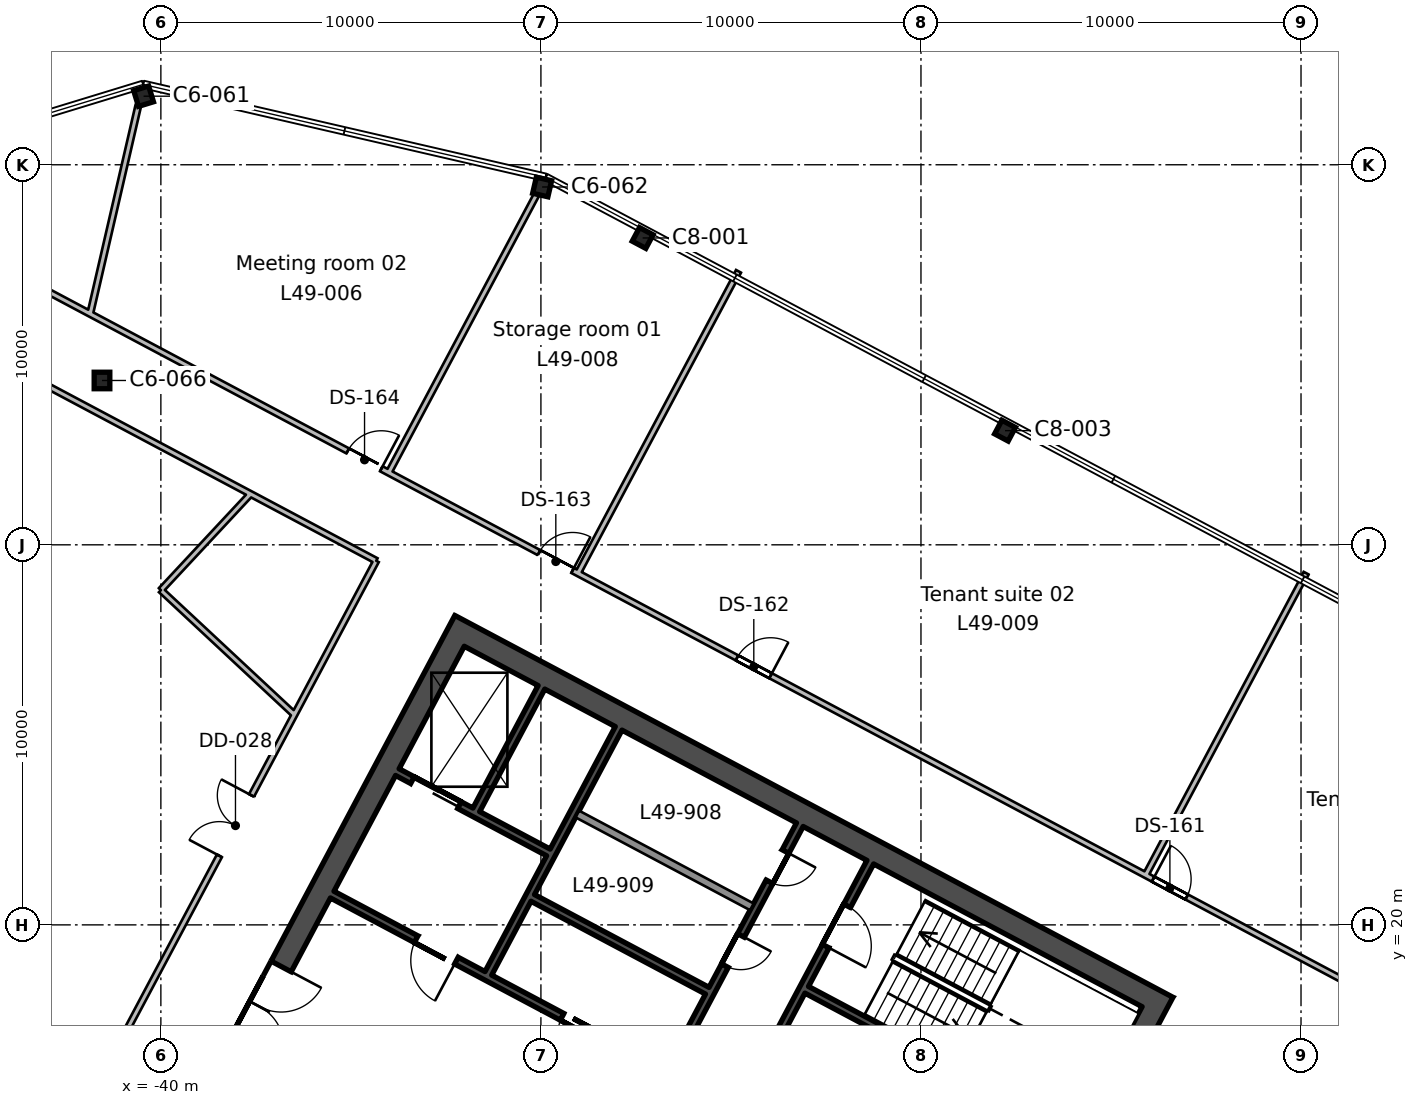
"""IFC4 building model, lengths in metres.
Left out: names, types, materials, properties, quantities, classifications, styles, units other than length and angle.
Written with IfcOpenShell. Run it as: python <this file> out.ifc"""

import sys

from ifc_helpers import new_model, si_unit, direction, frame, frame_2d, origin, origin_2d, place, context, subcontext, project, spatial, rectangle, i_section, extrude, element, fill, save


model = new_model("IFC4")
c1 = context("Model", 3, precision=1e-05, world=origin(), true_north=direction((0.0, 1.0)))
c2 = subcontext(c1, "Body", "Model", "MODEL_VIEW")
j1 = project(units=[si_unit("LENGTHUNIT", "METRE"), si_unit("PLANEANGLEUNIT", "RADIAN")], contexts=[c1])
p1 = place(None, origin())
s1 = spatial("IfcSite", under=j1, at=p1, CompositionType="ELEMENT")
p2 = place(p1, origin())
s2 = spatial("IfcBuilding", under=s1, at=p2, CompositionType="ELEMENT")
p3 = place(p2, frame((0.0, 0.0, 224.7)))
s3 = spatial("IfcBuildingStorey", under=s2, at=p3, CompositionType="ELEMENT", Elevation=224.7)
p4 = place(p3, frame((-17.788, 33.004, 0.0), z_axis=(0.0, 0.0, 1.0), x_axis=(-0.882947592859, 0.469471562786, 0.0)))
e1 = element("IfcColumn", 1, at=p4, inside=s3, PredefinedType="COLUMN", context=c2, shape_type="SweptSolid", body=[
    extrude(i_section(OverallWidth=0.404, OverallDepth=0.406, WebThickness=0.027, FlangeThickness=0.044, FilletRadius=0.015, at=origin_2d()), origin(), (0.0, 0.0, 1.0), 3.9),
])
p5 = place(p3, frame((-41.549, 34.324, 0.0), z_axis=(0.0, 0.0, 1.0), x_axis=(1.0, 0.0, 0.0)))
e2 = element("IfcColumn", 2, at=p5, inside=s3, PredefinedType="COLUMN", context=c2, shape_type="SweptSolid", body=[
    extrude(i_section(OverallWidth=0.412, OverallDepth=0.434, WebThickness=0.036, FlangeThickness=0.057, FilletRadius=0.015, at=origin_2d()), origin(), (0.0, 0.0, 1.0), 3.9),
])
p6 = place(p3, frame((-27.323, 38.074, 0.0), z_axis=(0.0, 0.0, 1.0), x_axis=(-0.882947592859, 0.469471562786, 0.0)))
e3 = element("IfcColumn", 3, at=p6, inside=s3, PredefinedType="COLUMN", context=c2, shape_type="SweptSolid", body=[
    extrude(i_section(OverallWidth=0.404, OverallDepth=0.406, WebThickness=0.027, FlangeThickness=0.044, FilletRadius=0.015, at=origin_2d()), origin(), (0.0, 0.0, 1.0), 3.9),
])
for number, where, z_axis, x_axis in (
    (4, (-29.968, 39.415, 0.0), (0.0, 0.0, 1.0), (-0.974, 0.225, 0.0)),
    (5, (-40.455, 41.804, 0.0), (0.0, 0.0, 1.0), (-0.956, -0.292, 0.0)),
):
    element("IfcColumn", number, at=place(p3, frame(where, z_axis=z_axis, x_axis=x_axis)), inside=s3, PredefinedType="COLUMN", context=c2, shape_type="SweptSolid", body=[
        extrude(i_section(OverallWidth=0.412, OverallDepth=0.434, WebThickness=0.036, FlangeThickness=0.057, FilletRadius=0.015, at=origin_2d()), origin(), (0.0, 0.0, 1.0), 3.9),
    ])
p7 = place(p3, frame((-13.635, 18.236, 0.0), z_axis=(0.0, 0.0, 1.0), x_axis=(-0.469478769487, -0.88294376095, 0.0)))
e6 = element("IfcWall", 6, at=p7, inside=s3, PredefinedType="SHEAR", context=c2, shape_type="SweptSolid", body=[
    extrude(rectangle(XDim=19.4, YDim=0.6, at=frame_2d((9.7, 0.0))), origin(), (0.0, 0.0, 1.0), 3.9),
])
p8 = place(p7, frame((6.7, 0.0, 0.0)))
e7 = element("IfcOpeningElement", 7, at=p8, cuts=e6, PredefinedType="OPENING", context=c2, shape_type="SweptSolid", body=[
    extrude(rectangle(XDim=2.4, YDim=2.4, at=frame_2d((1.2, 1.2))), frame((0.0, 0.31, 0.0), z_axis=(0.0, -1.0, 0.0), x_axis=(1.0, 0.0, 0.0)), (0.0, 0.0, 1.0), 0.62),
])
p9 = place(p3, frame((-32.0, 28.001, 0.0), z_axis=(0.0, 0.0, 1.0), x_axis=(-0.469468958625, -0.882948977511, 0.0)))
e8 = element("IfcWall", 8, at=p9, inside=s3, PredefinedType="SHEAR", context=c2, shape_type="SweptSolid", body=[
    extrude(rectangle(XDim=19.4, YDim=0.6, at=frame_2d((9.7, 0.0))), origin(), (0.0, 0.0, 1.0), 3.9),
])
p10 = place(p9, frame((10.3, 0.0, 0.0)))
e9 = element("IfcOpeningElement", 9, at=p10, cuts=e8, PredefinedType="OPENING", context=c2, shape_type="SweptSolid", body=[
    extrude(rectangle(XDim=2.4, YDim=2.4, at=frame_2d((1.2, 1.2))), frame((0.0, 0.31, 0.0), z_axis=(0.0, -1.0, 0.0), x_axis=(1.0, 0.0, 0.0)), (0.0, 0.0, 1.0), 0.62),
])
p11 = place(p3, frame((-14.041, 18.112, 0.0), z_axis=(0.0, 0.0, 1.0), x_axis=(-0.882947755831, 0.46947125628, 0.0)))
e10 = element("IfcWall", 10, at=p11, inside=s3, PredefinedType="SHEAR", context=c2, shape_type="SweptSolid", body=[
    extrude(rectangle(XDim=20.2, YDim=0.6, at=frame_2d((10.1, 0.0))), origin(), (0.0, 0.0, 1.0), 3.9),
])
p12 = place(p3, frame((-21.333, 21.649, 0.0), z_axis=(0.0, 0.0, 1.0), x_axis=(-0.469494272526, -0.882935517501, 0.0)))
e11 = element("IfcWall", 11, at=p12, inside=s3, PredefinedType="SHEAR", context=c2, shape_type="SweptSolid", body=[
    extrude(rectangle(XDim=7.3, YDim=0.2, at=frame_2d((3.65, 0.0))), origin(), (0.0, 0.0, 1.0), 3.9),
])
p13 = place(p12, frame((1.3, 0.0, 0.0)))
e12 = element("IfcOpeningElement", 12, at=p13, cuts=e11, PredefinedType="OPENING", context=c2, shape_type="SweptSolid", body=[
    extrude(rectangle(XDim=1.2, YDim=2.1, at=frame_2d((0.6, 1.05))), frame((0.0, 0.11, 0.0), z_axis=(0.0, -1.0, 0.0), x_axis=(1.0, 0.0, 0.0)), (0.0, 0.0, 1.0), 0.22),
])
p14 = place(p3, frame((-23.188, 22.635, 0.0), z_axis=(0.0, 0.0, 1.0), x_axis=(-0.469454336211, -0.882956752176, 0.0)))
e13 = element("IfcWall", 13, at=p14, inside=s3, PredefinedType="SHEAR", context=c2, shape_type="SweptSolid", body=[
    extrude(rectangle(XDim=7.3, YDim=0.2, at=frame_2d((3.65, 0.0))), origin(), (0.0, 0.0, 1.0), 3.9),
])
p15 = place(p14, frame((0.8, 0.0, 0.0)))
e14 = element("IfcOpeningElement", 14, at=p15, cuts=e13, PredefinedType="OPENING", context=c2, shape_type="SweptSolid", body=[
    extrude(rectangle(XDim=0.9, YDim=2.1, at=frame_2d((0.45, 1.05))), frame((0.0, 0.11, 0.0), z_axis=(0.0, -1.0, 0.0), x_axis=(1.0, 0.0, 0.0)), (0.0, 0.0, 1.0), 0.22),
])
p16 = place(p14, frame((3.3, 0.0, 0.0)))
e15 = element("IfcOpeningElement", 15, at=p16, cuts=e13, PredefinedType="OPENING", context=c2, shape_type="SweptSolid", body=[
    extrude(rectangle(XDim=0.9, YDim=2.1, at=frame_2d((0.45, 1.05))), frame((0.0, 0.11, 0.0), z_axis=(0.0, -1.0, 0.0), x_axis=(1.0, 0.0, 0.0)), (0.0, 0.0, 1.0), 0.22),
])
p17 = place(p3, frame((-27.955, 25.171, 0.0), z_axis=(0.0, 0.0, 1.0), x_axis=(-0.469480409012, -0.88294288918, 0.0)))
e16 = element("IfcWall", 16, at=p17, inside=s3, PredefinedType="SHEAR", context=c2, shape_type="SweptSolid", body=[
    extrude(rectangle(XDim=7.3, YDim=0.2, at=frame_2d((3.65, 0.0))), origin(), (0.0, 0.0, 1.0), 3.9),
])
p18 = place(p3, frame((-29.986, 26.25, 0.0), z_axis=(0.0, 0.0, 1.0), x_axis=(-0.469494272526, -0.882935517501, 0.0)))
e17 = element("IfcWall", 17, at=p18, inside=s3, PredefinedType="SHEAR", context=c2, shape_type="SweptSolid", body=[
    extrude(rectangle(XDim=3.65, YDim=0.2, at=frame_2d((1.825, 0.0))), origin(), (0.0, 0.0, 1.0), 3.9),
])
p19 = place(p3, frame((-24.449, 20.475, 0.0), z_axis=(0.0, 0.0, 1.0), x_axis=(-0.882934506056, 0.469496174655, 0.0)))
e18 = element("IfcWall", 18, at=p19, inside=s3, PredefinedType="SOLIDWALL", context=c2, shape_type="SweptSolid", body=[
    extrude(rectangle(XDim=5.2, YDim=0.2, at=frame_2d((2.6, 0.0))), origin(), (0.0, 0.0, 1.0), 3.9),
])
p20 = place(p3, frame((-15.942, 14.536, 0.0), z_axis=(0.0, 0.0, 1.0), x_axis=(-0.882946947542, 0.469472776449, 0.0)))
e19 = element("IfcWall", 19, at=p20, inside=s3, PredefinedType="SHEAR", context=c2, shape_type="SweptSolid", body=[
    extrude(rectangle(XDim=8.0, YDim=0.2, at=frame_2d((4.0, 0.0))), origin(), (0.0, 0.0, 1.0), 3.9),
])
p21 = place(p3, frame((-29.804, 21.906, 0.0), z_axis=(0.0, 0.0, 1.0), x_axis=(-0.882960433586, 0.469447412093, 0.0)))
e20 = element("IfcWall", 20, at=p21, inside=s3, PredefinedType="SHEAR", context=c2, shape_type="SweptSolid", body=[
    extrude(rectangle(XDim=4.5, YDim=0.2, at=frame_2d((2.25, 0.0))), origin(), (0.0, 0.0, 1.0), 3.9),
])
p22 = place(p21, frame((2.65, 0.0, 0.0)))
e21 = element("IfcOpeningElement", 21, at=p22, cuts=e20, PredefinedType="OPENING", context=c2, shape_type="SweptSolid", body=[
    extrude(rectangle(XDim=1.4, YDim=2.4, at=frame_2d((0.7, 1.2))), frame((0.0, 0.11, 0.0), z_axis=(0.0, -1.0, 0.0), x_axis=(1.0, 0.0, 0.0)), (0.0, 0.0, 1.0), 0.22),
])
p23 = place(p3, frame((-25.623, 18.268, 0.0), z_axis=(0.0, 0.0, 1.0), x_axis=(-0.882953967957, 0.469459572775, 0.0)))
e22 = element("IfcWall", 22, at=p23, inside=s3, PredefinedType="SHEAR", context=c2, shape_type="SweptSolid", body=[
    extrude(rectangle(XDim=5.2, YDim=0.2, at=frame_2d((2.6, 0.0))), origin(), (0.0, 0.0, 1.0), 3.9),
])
p24 = place(p3, frame((-26.662, 16.102, 0.0), z_axis=(0.0, 0.0, 1.0), x_axis=(-0.882940221191, 0.469485426614, 0.0)))
e23 = element("IfcWall", 23, at=p24, inside=s3, PredefinedType="SHEAR", context=c2, shape_type="SweptSolid", body=[
    extrude(rectangle(XDim=10.0, YDim=0.2, at=frame_2d((5.0, 0.0))), origin(), (0.0, 0.0, 1.0), 3.9),
])
p25 = place(p24, frame((6.3, 0.0, 0.0)))
e24 = element("IfcOpeningElement", 24, at=p25, cuts=e23, PredefinedType="OPENING", context=c2, shape_type="SweptSolid", body=[
    extrude(rectangle(XDim=1.2, YDim=2.1, at=frame_2d((0.6, 1.05))), frame((0.0, 0.11, 0.0), z_axis=(0.0, -1.0, 0.0), x_axis=(1.0, 0.0, 0.0)), (0.0, 0.0, 1.0), 0.22),
])
p26 = place(p24, frame((2.25, 0.0, 0.0)))
e25 = element("IfcOpeningElement", 25, at=p26, cuts=e23, PredefinedType="OPENING", context=c2, shape_type="SweptSolid", body=[
    extrude(rectangle(XDim=0.9, YDim=2.1, at=frame_2d((0.45, 1.05))), frame((0.0, 0.11, 0.0), z_axis=(0.0, -1.0, 0.0), x_axis=(1.0, 0.0, 0.0)), (0.0, 0.0, 1.0), 0.22),
])
p27 = place(p3, frame((-50.128, 17.948, 0.0), z_axis=(0.0, 0.0, 1.0), x_axis=(0.974372577987, -0.224940168193, 0.0)))
e26 = element("IfcWall", 26, at=p27, inside=s3, PredefinedType="PARTITIONING", context=c2, shape_type="SweptSolid", body=[
    extrude(rectangle(XDim=7.958, YDim=0.15, at=frame_2d((3.979, 0.0))), origin(), (0.0, 0.0, 1.0), 3.54),
])
p28 = place(p3, frame((-37.64, 31.339, 0.0), z_axis=(0.0, 0.0, 1.0), x_axis=(-0.681983873773, -0.731367210035, 0.0)))
e27 = element("IfcWall", 27, at=p28, inside=s3, PredefinedType="PARTITIONING", context=c2, shape_type="SweptSolid", body=[
    extrude(rectangle(XDim=3.461, YDim=0.15, at=frame_2d((1.73, 0.0))), origin(), (0.0, 0.0, 1.0), 3.54),
])
p29 = place(p3, frame((-40.0, 28.808, 0.0), z_axis=(0.0, 0.0, 1.0), x_axis=(0.731313661346, -0.682041295471, 0.0)))
e28 = element("IfcWall", 28, at=p29, inside=s3, PredefinedType="PARTITIONING", context=c2, shape_type="SweptSolid", body=[
    extrude(rectangle(XDim=4.806, YDim=0.15, at=frame_2d((2.403, 0.0))), origin(), (0.0, 0.0, 1.0), 3.54),
])
p30 = place(p3, frame((-41.769, 15.593, 0.0), z_axis=(0.0, 0.0, 1.0), x_axis=(-0.731378467381, 0.681971801067, 0.0)))
e29 = element("IfcWall", 29, at=p30, inside=s3, PredefinedType="PARTITIONING", context=c2, shape_type="SweptSolid", body=[
    extrude(rectangle(XDim=21.999, YDim=0.15, at=frame_2d((11.0, 0.0))), origin(), (0.0, 0.0, 1.0), 3.54),
])
p31 = place(p3, frame((-41.769, 15.592, 0.0), z_axis=(0.0, 0.0, 1.0), x_axis=(0.469444027343, 0.882962233163, 0.0)))
e30 = element("IfcWall", 30, at=p31, inside=s3, PredefinedType="PARTITIONING", context=c2, shape_type="SweptSolid", body=[
    extrude(rectangle(XDim=15.842, YDim=0.15, at=frame_2d((7.921, 0.0))), origin(), (0.0, 0.0, 1.0), 3.54),
])
p32 = place(p31, frame((7.05, 0.0, 0.0)))
e31 = element("IfcOpeningElement", 31, at=p32, cuts=e30, PredefinedType="OPENING", context=c2, shape_type="SweptSolid", body=[
    extrude(rectangle(XDim=1.8, YDim=2.1, at=frame_2d((0.9, 1.05))), frame((0.0, 0.085, 0.0), z_axis=(0.0, -1.0, 0.0), x_axis=(1.0, 0.0, 0.0)), (0.0, 0.0, 1.0), 0.17),
])
p33 = place(p3, frame((-34.332, 29.58, 0.0), z_axis=(0.0, 0.0, 1.0), x_axis=(-0.882939350293, 0.46948706447, 0.0)))
e32 = element("IfcWall", 32, at=p33, inside=s3, PredefinedType="PARTITIONING", context=c2, shape_type="SweptSolid", body=[
    extrude(rectangle(XDim=19.327, YDim=0.15, at=frame_2d((9.664, 0.0))), origin(), (0.0, 0.0, 1.0), 3.54),
])
p34 = place(p3, frame((-48.812, 39.771, 0.0), z_axis=(0.0, 0.0, 1.0), x_axis=(0.882945384259, -0.469475716535, 0.0)))
e33 = element("IfcWall", 33, at=p34, inside=s3, PredefinedType="PARTITIONING", context=c2, shape_type="SweptSolid", body=[
    extrude(rectangle(XDim=55.283, YDim=0.15, at=frame_2d((27.642, 0.0))), origin(), (0.0, 0.0, 1.0), 3.54),
])
p35 = place(p34, frame((39.55, 0.0, 0.0)))
e34 = element("IfcOpeningElement", 34, at=p35, cuts=e33, PredefinedType="OPENING", context=c2, shape_type="SweptSolid", body=[
    extrude(rectangle(XDim=1.0, YDim=2.1, at=frame_2d((0.5, 1.05))), frame((0.0, 0.085, 0.0), z_axis=(0.0, -1.0, 0.0), x_axis=(1.0, 0.0, 0.0)), (0.0, 0.0, 1.0), 0.17),
])
p36 = place(p34, frame((27.15, 0.0, 0.0)))
e35 = element("IfcOpeningElement", 35, at=p36, cuts=e33, PredefinedType="OPENING", context=c2, shape_type="SweptSolid", body=[
    extrude(rectangle(XDim=1.0, YDim=2.1, at=frame_2d((0.5, 1.05))), frame((0.0, 0.085, 0.0), z_axis=(0.0, -1.0, 0.0), x_axis=(1.0, 0.0, 0.0)), (0.0, 0.0, 1.0), 0.17),
])
p37 = place(p34, frame((21.25, 0.0, 0.0)))
e36 = element("IfcOpeningElement", 36, at=p37, cuts=e33, PredefinedType="OPENING", context=c2, shape_type="SweptSolid", body=[
    extrude(rectangle(XDim=1.0, YDim=2.1, at=frame_2d((0.5, 1.05))), frame((0.0, 0.085, 0.0), z_axis=(0.0, -1.0, 0.0), x_axis=(1.0, 0.0, 0.0)), (0.0, 0.0, 1.0), 0.17),
])
p38 = place(p34, frame((15.55, 0.0, 0.0)))
e37 = element("IfcOpeningElement", 37, at=p38, cuts=e33, PredefinedType="OPENING", context=c2, shape_type="SweptSolid", body=[
    extrude(rectangle(XDim=1.0, YDim=2.1, at=frame_2d((0.5, 1.05))), frame((0.0, 0.085, 0.0), z_axis=(0.0, -1.0, 0.0), x_axis=(1.0, 0.0, 0.0)), (0.0, 0.0, 1.0), 0.17),
])
p39 = place(p3, frame((-30.109, 39.225, 0.0), z_axis=(0.0, 0.0, 1.0), x_axis=(-0.469479281405, -0.882943488753, 0.0)))
e38 = element("IfcWall", 38, at=p39, inside=s3, PredefinedType="PARTITIONING", context=c2, shape_type="SweptSolid", body=[
    extrude(rectangle(XDim=8.299, YDim=0.15, at=frame_2d((4.149, 0.0))), origin(), (0.0, 0.0, 1.0), 3.54),
])
p40 = place(p3, frame((-41.86, 36.075, 0.0), z_axis=(0.0, 0.0, 1.0), x_axis=(0.225075040805, 0.974341431946, 0.0)))
e39 = element("IfcWall", 39, at=p40, inside=s3, PredefinedType="PARTITIONING", context=c2, shape_type="SweptSolid", body=[
    extrude(rectangle(XDim=5.625, YDim=0.15, at=frame_2d((2.812, 0.0))), origin(), (0.0, 0.0, 1.0), 3.54),
])
p41 = place(p3, frame((-24.8, 37.197, 0.0), z_axis=(0.0, 0.0, 1.0), x_axis=(-0.469544588835, -0.882908760346, 0.0)))
e40 = element("IfcWall", 40, at=p41, inside=s3, PredefinedType="PARTITIONING", context=c2, shape_type="SweptSolid", body=[
    extrude(rectangle(XDim=9.0, YDim=0.15, at=frame_2d((4.5, 0.0))), origin(), (0.0, 0.0, 1.0), 3.54),
])
p42 = place(p3, frame((-9.864, 29.255, 0.0), z_axis=(0.0, 0.0, 1.0), x_axis=(-0.469492391546, -0.882936517696, 0.0)))
e41 = element("IfcWall", 41, at=p42, inside=s3, PredefinedType="PARTITIONING", context=c2, shape_type="SweptSolid", body=[
    extrude(rectangle(XDim=8.999, YDim=0.15, at=frame_2d((4.5, 0.0))), origin(), (0.0, 0.0, 1.0), 3.54),
])
p43 = place(p10, origin())
e42 = element("IfcDoor", 42, at=p43, inside=s3, OperationType="DOUBLE_DOOR_SINGLE_SWING", PredefinedType="DOOR", context=c2, shape_type="SweptSolid", body=[
    extrude(rectangle(XDim=2.4, YDim=2.4, at=frame_2d((1.2, 1.2))), frame((0.0, 0.025, 0.0), z_axis=(0.0, -1.0, 0.0), x_axis=(1.0, 0.0, 0.0)), (0.0, 0.0, 1.0), 0.05),
])
fill(e9, e42)
p44 = place(p25, origin())
e43 = element("IfcDoor", 43, at=p44, inside=s3, OperationType="SINGLE_SWING_LEFT", PredefinedType="DOOR", context=c2, shape_type="SweptSolid", body=[
    extrude(rectangle(XDim=1.2, YDim=2.1, at=frame_2d((0.6, 1.05))), frame((0.0, 0.025, 0.0), z_axis=(0.0, -1.0, 0.0), x_axis=(1.0, 0.0, 0.0)), (0.0, 0.0, 1.0), 0.05),
])
fill(e24, e43)
p45 = place(p13, origin())
e44 = element("IfcDoor", 44, at=p45, inside=s3, OperationType="SINGLE_SWING_RIGHT", PredefinedType="DOOR", context=c2, shape_type="SweptSolid", body=[
    extrude(rectangle(XDim=1.2, YDim=2.1, at=frame_2d((0.6, 1.05))), frame((0.0, 0.025, 0.0), z_axis=(0.0, -1.0, 0.0), x_axis=(1.0, 0.0, 0.0)), (0.0, 0.0, 1.0), 0.05),
])
fill(e12, e44)
p46 = place(p26, origin())
e45 = element("IfcDoor", 45, at=p46, inside=s3, OperationType="SINGLE_SWING_LEFT", PredefinedType="DOOR", context=c2, shape_type="SweptSolid", body=[
    extrude(rectangle(XDim=0.9, YDim=2.1, at=frame_2d((0.45, 1.05))), frame((0.0, 0.025, 0.0), z_axis=(0.0, -1.0, 0.0), x_axis=(1.0, 0.0, 0.0)), (0.0, 0.0, 1.0), 0.05),
])
fill(e25, e45)
p47 = place(p22, origin())
e46 = element("IfcDoor", 46, at=p47, inside=s3, OperationType="DOUBLE_DOOR_SLIDING", PredefinedType="DOOR", context=c2, shape_type="SweptSolid", body=[
    extrude(rectangle(XDim=1.4, YDim=2.4, at=frame_2d((0.7, 1.2))), frame((0.0, 0.025, 0.0), z_axis=(0.0, -1.0, 0.0), x_axis=(1.0, 0.0, 0.0)), (0.0, 0.0, 1.0), 0.05),
])
fill(e21, e46)
p48 = place(p15, origin())
e47 = element("IfcDoor", 47, at=p48, inside=s3, OperationType="SINGLE_SWING_LEFT", PredefinedType="DOOR", context=c2, shape_type="SweptSolid", body=[
    extrude(rectangle(XDim=0.9, YDim=2.1, at=frame_2d((0.45, 1.05))), frame((0.0, 0.025, 0.0), z_axis=(0.0, -1.0, 0.0), x_axis=(1.0, 0.0, 0.0)), (0.0, 0.0, 1.0), 0.05),
])
fill(e14, e47)
p49 = place(p16, origin())
e48 = element("IfcDoor", 48, at=p49, inside=s3, OperationType="SINGLE_SWING_LEFT", PredefinedType="DOOR", context=c2, shape_type="SweptSolid", body=[
    extrude(rectangle(XDim=0.9, YDim=2.1, at=frame_2d((0.45, 1.05))), frame((0.0, 0.025, 0.0), z_axis=(0.0, -1.0, 0.0), x_axis=(1.0, 0.0, 0.0)), (0.0, 0.0, 1.0), 0.05),
])
fill(e15, e48)
p50 = place(p32, origin())
e49 = element("IfcDoor", 49, at=p50, inside=s3, OperationType="DOUBLE_DOOR_SINGLE_SWING", PredefinedType="DOOR", context=c2, shape_type="SweptSolid", body=[
    extrude(rectangle(XDim=1.8, YDim=2.1, at=frame_2d((0.9, 1.05))), frame((0.0, 0.025, 0.0), z_axis=(0.0, -1.0, 0.0), x_axis=(1.0, 0.0, 0.0)), (0.0, 0.0, 1.0), 0.05),
])
fill(e31, e49)
p51 = place(p35, origin())
e50 = element("IfcDoor", 50, at=p51, inside=s3, OperationType="SINGLE_SWING_LEFT", PredefinedType="DOOR", context=c2, shape_type="SweptSolid", body=[
    extrude(rectangle(XDim=1.0, YDim=2.1, at=frame_2d((0.5, 1.05))), frame((0.0, 0.025, 0.0), z_axis=(0.0, -1.0, 0.0), x_axis=(1.0, 0.0, 0.0)), (0.0, 0.0, 1.0), 0.05),
])
fill(e34, e50)
p52 = place(p36, origin())
e51 = element("IfcDoor", 51, at=p52, inside=s3, OperationType="SINGLE_SWING_RIGHT", PredefinedType="DOOR", context=c2, shape_type="SweptSolid", body=[
    extrude(rectangle(XDim=1.0, YDim=2.1, at=frame_2d((0.5, 1.05))), frame((0.0, 0.025, 0.0), z_axis=(0.0, -1.0, 0.0), x_axis=(1.0, 0.0, 0.0)), (0.0, 0.0, 1.0), 0.05),
])
fill(e35, e51)
p53 = place(p37, origin())
e52 = element("IfcDoor", 52, at=p53, inside=s3, OperationType="SINGLE_SWING_RIGHT", PredefinedType="DOOR", context=c2, shape_type="SweptSolid", body=[
    extrude(rectangle(XDim=1.0, YDim=2.1, at=frame_2d((0.5, 1.05))), frame((0.0, 0.025, 0.0), z_axis=(0.0, -1.0, 0.0), x_axis=(1.0, 0.0, 0.0)), (0.0, 0.0, 1.0), 0.05),
])
fill(e36, e52)
p54 = place(p38, origin())
e53 = element("IfcDoor", 53, at=p54, inside=s3, OperationType="SINGLE_SWING_RIGHT", PredefinedType="DOOR", context=c2, shape_type="SweptSolid", body=[
    extrude(rectangle(XDim=1.0, YDim=2.1, at=frame_2d((0.5, 1.05))), frame((0.0, 0.025, 0.0), z_axis=(0.0, -1.0, 0.0), x_axis=(1.0, 0.0, 0.0)), (0.0, 0.0, 1.0), 0.05),
])
fill(e37, e53)
save(model, sys.argv[1])
